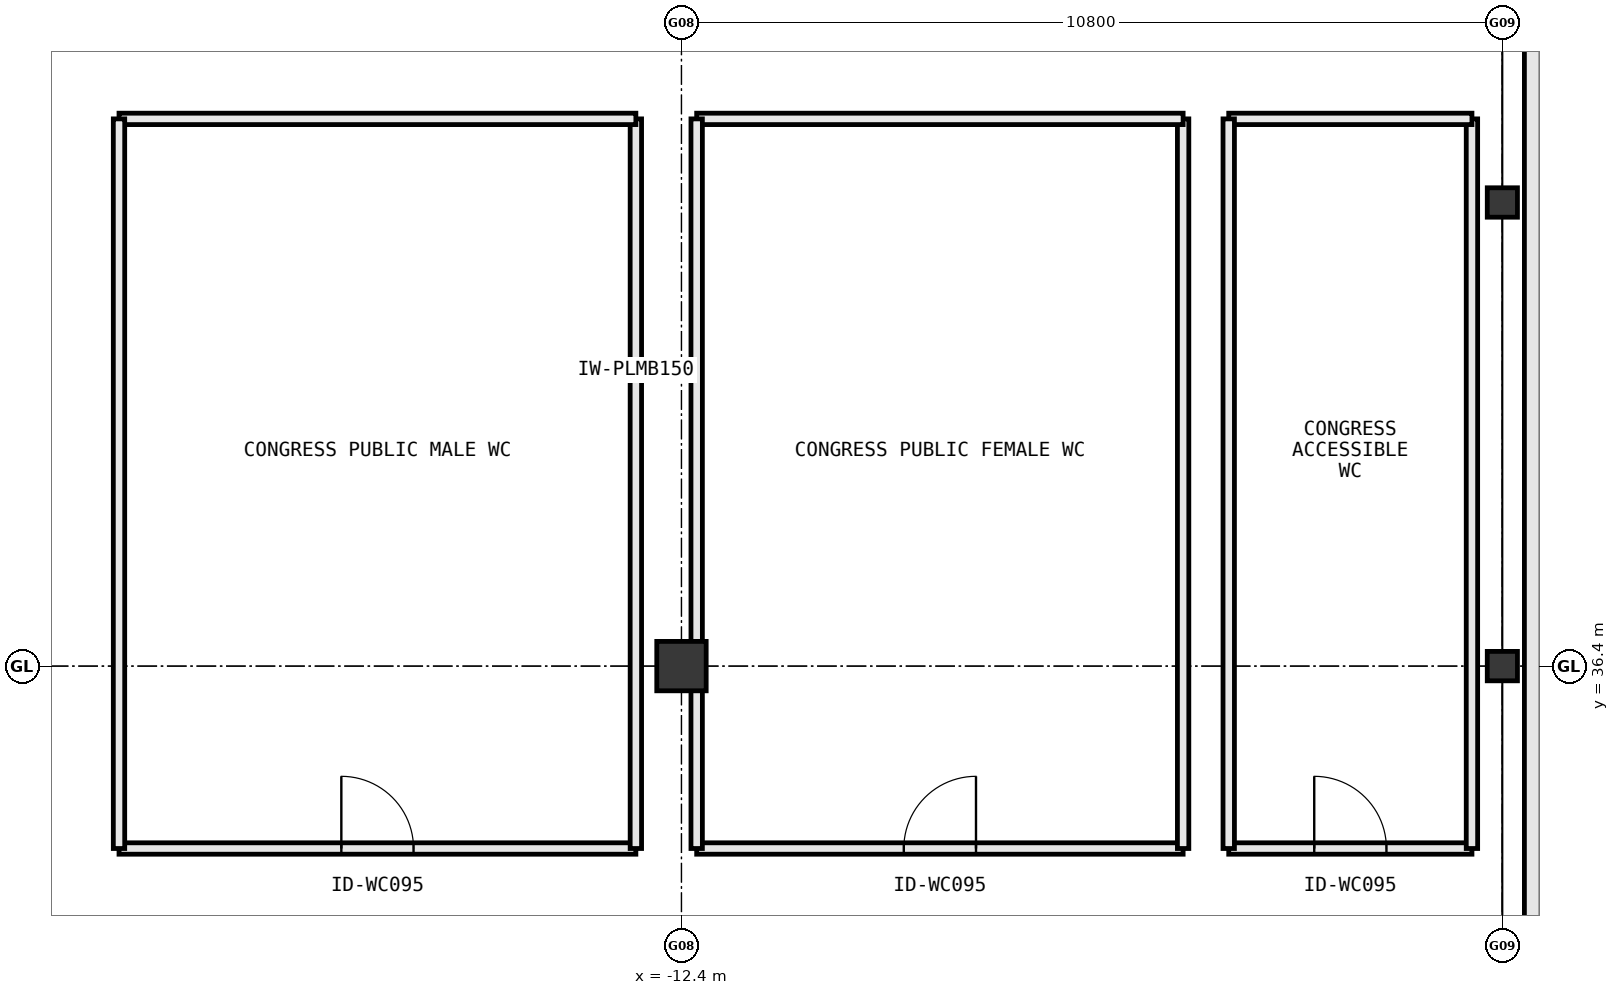
"""IFC4 building model, lengths in metres.
Left out: names, types, materials, properties, quantities, classifications, styles, units other than length and angle.
Written with IfcOpenShell. Run it as: python <this file> out.ifc"""

import sys

from ifc_helpers import new_model, si_unit, direction, frame, frame_2d, origin, origin_2d, place, context, subcontext, project, spatial, rectangle, i_section, extrude, element, fill, save


model = new_model("IFC4")
c1 = context("Model", 3, precision=1e-05, world=origin(), true_north=direction((0.0, 1.0)))
c2 = subcontext(c1, "Body", "Model", "MODEL_VIEW")
j1 = project(units=[si_unit("LENGTHUNIT", "METRE"), si_unit("PLANEANGLEUNIT", "RADIAN")], contexts=[c1])
p1 = place(None, origin())
s1 = spatial("IfcSite", under=j1, at=p1, CompositionType="ELEMENT")
p2 = place(p1, origin())
s2 = spatial("IfcBuilding", under=s1, at=p2, CompositionType="ELEMENT")
p3 = place(p2, origin())
s3 = spatial("IfcBuildingStorey", under=s2, at=p3, CompositionType="ELEMENT", Elevation=0.0)
p4 = place(p3, frame((-12.4, 36.4, 0.0), z_axis=(0.0, 0.0, 1.0), x_axis=(1.0, 0.0, 0.0)))
e1 = element("IfcColumn", 1, at=p4, inside=s3, PredefinedType="COLUMN", context=c2, shape_type="SweptSolid", body=[
    extrude(rectangle(XDim=0.65, YDim=0.65, at=origin_2d()), origin(), (0.0, 0.0, 1.0), 5.4),
])
for number, where, z_axis, x_axis in (
    (2, (-1.6, 36.4, 0.0), (0.0, 0.0, 1.0), (1.0, 0.0, 0.0)),
    (3, (-1.6, 42.5, 0.0), (0.0, 0.0, 1.0), (1.0, 0.0, 0.0)),
):
    element("IfcColumn", number, at=place(p3, frame(where, z_axis=z_axis, x_axis=x_axis)), inside=s3, PredefinedType="COLUMN", context=c2, shape_type="SweptSolid", body=[
        extrude(i_section(OverallWidth=0.397, OverallDepth=0.387, WebThickness=0.021, FlangeThickness=0.033, at=origin_2d()), origin(), (0.0, 0.0, 1.0), 5.4),
    ])
p5 = place(p3, frame((-19.8, 34.0, 0.0), z_axis=(0.0, 0.0, 1.0), x_axis=(1.0, 0.0, 0.0)))
e4 = element("IfcWall", 4, at=p5, inside=s3, PredefinedType="PLUMBINGWALL", context=c2, shape_type="SweptSolid", body=[
    extrude(rectangle(XDim=6.8, YDim=0.15, at=frame_2d((3.4, 0.0))), origin(), (0.0, 0.0, 1.0), 5.12),
])
p6 = place(p5, frame((2.925, 0.0, 0.0)))
e5 = element("IfcOpeningElement", 5, at=p6, cuts=e4, PredefinedType="OPENING", context=c2, shape_type="SweptSolid", body=[
    extrude(rectangle(XDim=0.95, YDim=2.15, at=frame_2d((0.475, 1.075))), frame((0.0, 0.087, 0.0), z_axis=(0.0, -1.0, 0.0), x_axis=(1.0, 0.0, 0.0)), (0.0, 0.0, 1.0), 0.174),
])
p7 = place(p3, frame((-13.0, 34.0, 0.0), z_axis=(0.0, 0.0, 1.0), x_axis=(0.0, 1.0, 0.0)))
e6 = element("IfcWall", 6, at=p7, inside=s3, PredefinedType="PLUMBINGWALL", context=c2, shape_type="SweptSolid", body=[
    extrude(rectangle(XDim=9.6, YDim=0.15, at=frame_2d((4.8, 0.0))), origin(), (0.0, 0.0, 1.0), 5.12),
])
p8 = place(p3, frame((-13.0, 43.6, 0.0), z_axis=(0.0, 0.0, 1.0), x_axis=(-1.0, 0.0, 0.0)))
e7 = element("IfcWall", 7, at=p8, inside=s3, PredefinedType="PLUMBINGWALL", context=c2, shape_type="SweptSolid", body=[
    extrude(rectangle(XDim=6.8, YDim=0.15, at=frame_2d((3.4, 0.0))), origin(), (0.0, 0.0, 1.0), 5.12),
])
p9 = place(p3, frame((-19.8, 43.6, 0.0), z_axis=(0.0, 0.0, 1.0), x_axis=(0.0, -1.0, 0.0)))
e8 = element("IfcWall", 8, at=p9, inside=s3, PredefinedType="PLUMBINGWALL", context=c2, shape_type="SweptSolid", body=[
    extrude(rectangle(XDim=9.6, YDim=0.15, at=frame_2d((4.8, 0.0))), origin(), (0.0, 0.0, 1.0), 5.12),
])
p10 = place(p3, frame((-12.2, 34.0, 0.0), z_axis=(0.0, 0.0, 1.0), x_axis=(1.0, 0.0, 0.0)))
e9 = element("IfcWall", 9, at=p10, inside=s3, PredefinedType="PLUMBINGWALL", context=c2, shape_type="SweptSolid", body=[
    extrude(rectangle(XDim=6.4, YDim=0.15, at=frame_2d((3.2, 0.0))), origin(), (0.0, 0.0, 1.0), 5.12),
])
p11 = place(p10, frame((2.725, 0.0, 0.0)))
e10 = element("IfcOpeningElement", 10, at=p11, cuts=e9, PredefinedType="OPENING", context=c2, shape_type="SweptSolid", body=[
    extrude(rectangle(XDim=0.95, YDim=2.15, at=frame_2d((0.475, 1.075))), frame((0.0, 0.087, 0.0), z_axis=(0.0, -1.0, 0.0), x_axis=(1.0, 0.0, 0.0)), (0.0, 0.0, 1.0), 0.174),
])
p12 = place(p3, frame((-5.8, 34.0, 0.0), z_axis=(0.0, 0.0, 1.0), x_axis=(0.0, 1.0, 0.0)))
e11 = element("IfcWall", 11, at=p12, inside=s3, PredefinedType="PLUMBINGWALL", context=c2, shape_type="SweptSolid", body=[
    extrude(rectangle(XDim=9.6, YDim=0.15, at=frame_2d((4.8, 0.0))), origin(), (0.0, 0.0, 1.0), 5.12),
])
p13 = place(p3, frame((-5.8, 43.6, 0.0), z_axis=(0.0, 0.0, 1.0), x_axis=(-1.0, 0.0, 0.0)))
e12 = element("IfcWall", 12, at=p13, inside=s3, PredefinedType="PLUMBINGWALL", context=c2, shape_type="SweptSolid", body=[
    extrude(rectangle(XDim=6.4, YDim=0.15, at=frame_2d((3.2, 0.0))), origin(), (0.0, 0.0, 1.0), 5.12),
])
p14 = place(p3, frame((-12.2, 43.6, 0.0), z_axis=(0.0, 0.0, 1.0), x_axis=(0.0, -1.0, 0.0)))
e13 = element("IfcWall", 13, at=p14, inside=s3, PredefinedType="PLUMBINGWALL", context=c2, shape_type="SweptSolid", body=[
    extrude(rectangle(XDim=9.6, YDim=0.15, at=frame_2d((4.8, 0.0))), origin(), (0.0, 0.0, 1.0), 4.422),
])
p15 = place(p3, frame((-5.2, 34.0, 0.0), z_axis=(0.0, 0.0, 1.0), x_axis=(1.0, 0.0, 0.0)))
e14 = element("IfcWall", 14, at=p15, inside=s3, PredefinedType="PLUMBINGWALL", context=c2, shape_type="SweptSolid", body=[
    extrude(rectangle(XDim=3.2, YDim=0.15, at=frame_2d((1.6, 0.0))), origin(), (0.0, 0.0, 1.0), 5.12),
])
p16 = place(p15, frame((1.125, 0.0, 0.0)))
e15 = element("IfcOpeningElement", 15, at=p16, cuts=e14, PredefinedType="OPENING", context=c2, shape_type="SweptSolid", body=[
    extrude(rectangle(XDim=0.95, YDim=2.15, at=frame_2d((0.475, 1.075))), frame((0.0, 0.087, 0.0), z_axis=(0.0, -1.0, 0.0), x_axis=(1.0, 0.0, 0.0)), (0.0, 0.0, 1.0), 0.174),
])
p17 = place(p3, frame((-2.0, 34.0, 0.0), z_axis=(0.0, 0.0, 1.0), x_axis=(0.0, 1.0, 0.0)))
e16 = element("IfcWall", 16, at=p17, inside=s3, PredefinedType="PLUMBINGWALL", context=c2, shape_type="SweptSolid", body=[
    extrude(rectangle(XDim=9.6, YDim=0.15, at=frame_2d((4.8, 0.0))), origin(), (0.0, 0.0, 1.0), 4.498),
])
p18 = place(p3, frame((-2.0, 43.6, 0.0), z_axis=(0.0, 0.0, 1.0), x_axis=(-1.0, 0.0, 0.0)))
e17 = element("IfcWall", 17, at=p18, inside=s3, PredefinedType="PLUMBINGWALL", context=c2, shape_type="SweptSolid", body=[
    extrude(rectangle(XDim=3.2, YDim=0.15, at=frame_2d((1.6, 0.0))), origin(), (0.0, 0.0, 1.0), 5.12),
])
p19 = place(p3, frame((-5.2, 43.6, 0.0), z_axis=(0.0, 0.0, 1.0), x_axis=(0.0, -1.0, 0.0)))
e18 = element("IfcWall", 18, at=p19, inside=s3, PredefinedType="PLUMBINGWALL", context=c2, shape_type="SweptSolid", body=[
    extrude(rectangle(XDim=9.6, YDim=0.15, at=frame_2d((4.8, 0.0))), origin(), (0.0, 0.0, 1.0), 4.658),
])
p20 = place(p3, frame((-1.2, 57.4, 0.0), z_axis=(0.0, 0.0, 1.0), x_axis=(0.0, -1.0, 0.0)))
e19 = element("IfcWall", 19, at=p20, inside=s3, PredefinedType="STANDARD", context=c2, shape_type="SweptSolid", body=[
    extrude(rectangle(XDim=30.0, YDim=0.22, at=frame_2d((15.0, 0.0))), origin(), (0.0, 0.0, 1.0), 4.422),
])
p21 = place(p6, origin())
e20 = element("IfcDoor", 20, at=p21, inside=s3, OperationType="SINGLE_SWING_LEFT", PredefinedType="DOOR", context=c2, shape_type="SweptSolid", body=[
    extrude(rectangle(XDim=0.95, YDim=2.15, at=frame_2d((0.475, 1.075))), frame((0.0, 0.025, 0.0), z_axis=(0.0, -1.0, 0.0), x_axis=(1.0, 0.0, 0.0)), (0.0, 0.0, 1.0), 0.05),
])
fill(e5, e20)
p22 = place(p11, origin())
e21 = element("IfcDoor", 21, at=p22, inside=s3, OperationType="SINGLE_SWING_RIGHT", PredefinedType="DOOR", context=c2, shape_type="SweptSolid", body=[
    extrude(rectangle(XDim=0.95, YDim=2.15, at=frame_2d((0.475, 1.075))), frame((0.0, 0.025, 0.0), z_axis=(0.0, -1.0, 0.0), x_axis=(1.0, 0.0, 0.0)), (0.0, 0.0, 1.0), 0.05),
])
fill(e10, e21)
p23 = place(p16, origin())
e22 = element("IfcDoor", 22, at=p23, inside=s3, OperationType="SINGLE_SWING_LEFT", PredefinedType="DOOR", context=c2, shape_type="SweptSolid", body=[
    extrude(rectangle(XDim=0.95, YDim=2.15, at=frame_2d((0.475, 1.075))), frame((0.0, 0.025, 0.0), z_axis=(0.0, -1.0, 0.0), x_axis=(1.0, 0.0, 0.0)), (0.0, 0.0, 1.0), 0.05),
])
fill(e15, e22)
save(model, sys.argv[1])
